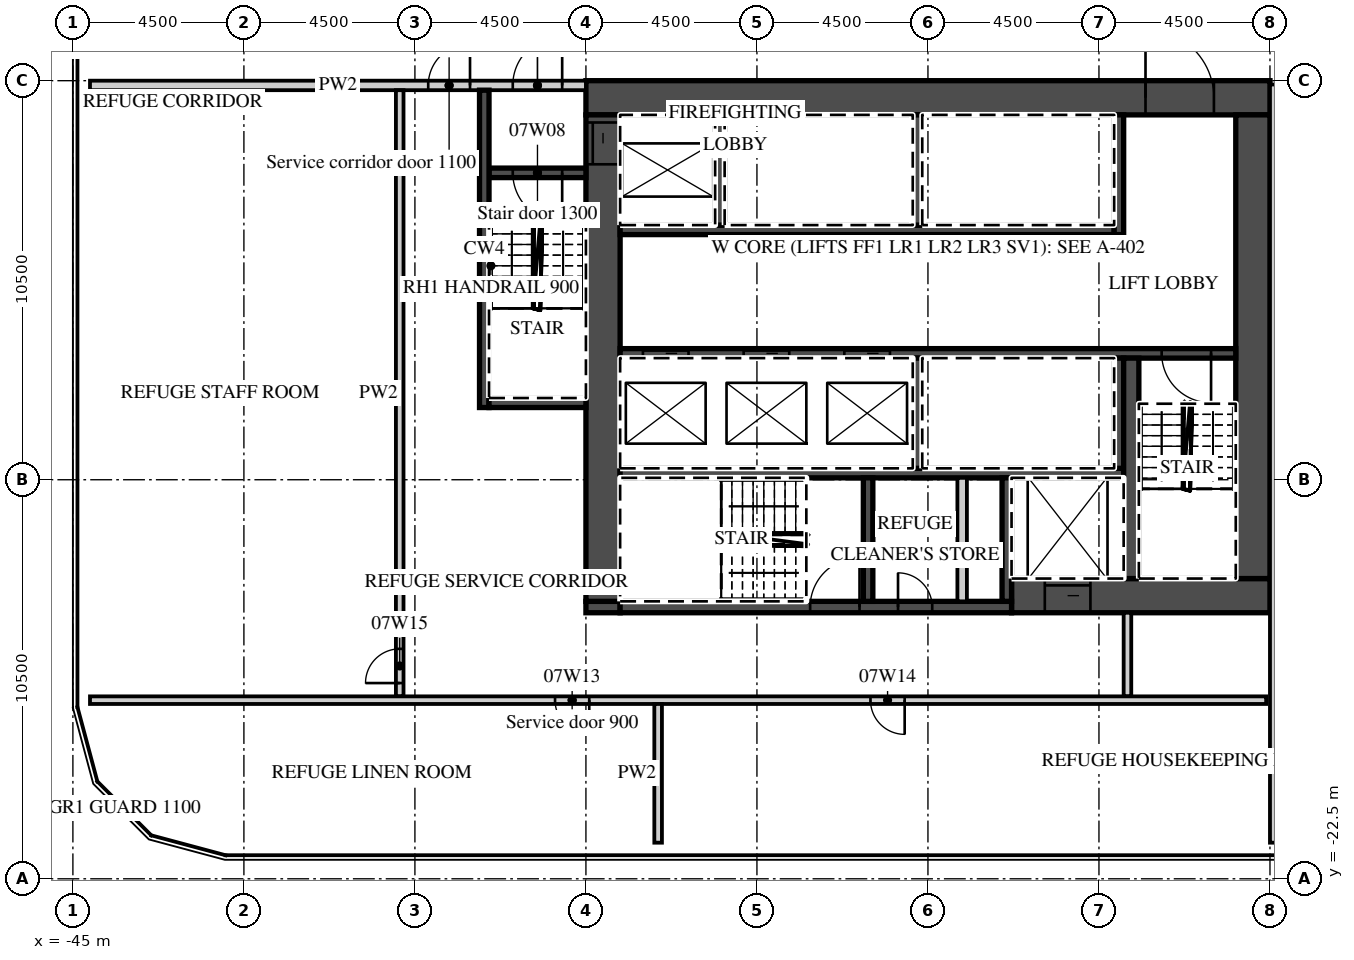
"""IFC4 building model, lengths in metres.
Left out: names, types, materials, properties, quantities, classifications, styles, units other than length and angle.
Written with IfcOpenShell. Run it as: python <this file> out.ifc"""

import sys

from ifc_helpers import new_model, si_unit, direction, frame, frame_2d, origin, place, context, subcontext, project, spatial, rectangle, extrude, element, fill, save


model = new_model("IFC4")
c1 = context("Model", 3, precision=1e-05, world=origin(), true_north=direction((0.0, 1.0)))
c2 = subcontext(c1, "Body", "Model", "MODEL_VIEW")
j1 = project(units=[si_unit("LENGTHUNIT", "METRE"), si_unit("PLANEANGLEUNIT", "RADIAN")], contexts=[c1])
p1 = place(None, origin())
s1 = spatial("IfcSite", under=j1, at=p1, CompositionType="ELEMENT")
p2 = place(p1, origin())
s2 = spatial("IfcBuilding", under=s1, at=p2, CompositionType="ELEMENT")
p3 = place(p2, frame((0.0, 0.0, 47.0)))
s3 = spatial("IfcBuildingStorey", under=s2, at=p3, CompositionType="ELEMENT", Elevation=47.0)
p4 = place(p3, frame((-31.5, -1.95, 0.0), z_axis=(0.0, 0.0, 1.0), x_axis=(1.0, 0.0, 0.0)))
e1 = element("IfcWall", 1, at=p4, inside=s3, PredefinedType="SHEAR", context=c2, shape_type="SweptSolid", body=[
    extrude(rectangle(XDim=18.0, YDim=0.9, at=frame_2d((9.0, 0.0))), origin(), (0.0, 0.0, 1.0), 5.6),
])
p5 = place(p4, frame((14.725, 0.0, 0.0)))
e2 = element("IfcOpeningElement", 2, at=p5, cuts=e1, PredefinedType="OPENING", context=c2, shape_type="SweptSolid", body=[
    extrude(rectangle(XDim=1.8, YDim=2.1, at=frame_2d((0.9, 1.05))), frame((0.0, 0.46, 0.0), z_axis=(0.0, -1.0, 0.0), x_axis=(1.0, 0.0, 0.0)), (0.0, 0.0, 1.0), 0.92),
])
p6 = place(p3, frame((-20.3, -15.05, 0.0), z_axis=(0.0, 0.0, 1.0), x_axis=(1.0, 0.0, 0.0)))
e3 = element("IfcWall", 3, at=p6, inside=s3, PredefinedType="SHEAR", context=c2, shape_type="SweptSolid", body=[
    extrude(rectangle(XDim=6.8, YDim=0.9, at=frame_2d((3.4, 0.0))), origin(), (0.0, 0.0, 1.0), 5.6),
])
p7 = place(p6, frame((0.875, 0.0, 0.0)))
e4 = element("IfcOpeningElement", 4, at=p7, cuts=e3, PredefinedType="OPENING", context=c2, shape_type="SweptSolid", body=[
    extrude(rectangle(XDim=1.2, YDim=2.1, at=frame_2d((0.6, 1.05))), frame((0.0, 0.46, 0.0), z_axis=(0.0, -1.0, 0.0), x_axis=(1.0, 0.0, 0.0)), (0.0, 0.0, 1.0), 0.92),
])
p8 = place(p3, frame((-31.5, -15.35, 0.0), z_axis=(0.0, 0.0, 1.0), x_axis=(1.0, 0.0, 0.0)))
e5 = element("IfcWall", 5, at=p8, inside=s3, PredefinedType="SHEAR", context=c2, shape_type="SweptSolid", body=[
    extrude(rectangle(XDim=0.9, YDim=0.3, at=frame_2d((0.45, 0.0))), origin(), (0.0, 0.0, 1.0), 5.6),
])
p9 = place(p3, frame((-30.6, -15.35, 0.0), z_axis=(0.0, 0.0, 1.0), x_axis=(1.0, 0.0, 0.0)))
e6 = element("IfcWall", 6, at=p9, inside=s3, PredefinedType="SHEAR", context=c2, shape_type="SweptSolid", body=[
    extrude(rectangle(XDim=10.3, YDim=0.3, at=frame_2d((5.15, 0.0))), origin(), (0.0, 0.0, 1.0), 5.6),
])
p10 = place(p9, frame((5.0, 0.0, 0.0)))
e7 = element("IfcOpeningElement", 7, at=p10, cuts=e6, PredefinedType="OPENING", context=c2, shape_type="SweptSolid", body=[
    extrude(rectangle(XDim=1.3, YDim=2.1, at=frame_2d((0.65, 1.05))), frame((0.0, 0.16, 0.0), z_axis=(0.0, -1.0, 0.0), x_axis=(1.0, 0.0, 0.0)), (0.0, 0.0, 1.0), 0.32),
])
p11 = place(p9, frame((7.312, 0.0, 0.0)))
e8 = element("IfcOpeningElement", 8, at=p11, cuts=e6, PredefinedType="OPENING", context=c2, shape_type="SweptSolid", body=[
    extrude(rectangle(XDim=0.9, YDim=2.1, at=frame_2d((0.45, 1.05))), frame((0.0, 0.16, 0.0), z_axis=(0.0, -1.0, 0.0), x_axis=(1.0, 0.0, 0.0)), (0.0, 0.0, 1.0), 0.32),
])
p12 = place(p3, frame((-31.05, -15.2, 0.0), z_axis=(0.0, 0.0, 1.0), x_axis=(0.0, 1.0, 0.0)))
e9 = element("IfcWall", 9, at=p12, inside=s3, PredefinedType="SHEAR", context=c2, shape_type="SweptSolid", body=[
    extrude(rectangle(XDim=12.8, YDim=0.9, at=frame_2d((6.4, 0.0))), origin(), (0.0, 0.0, 1.0), 5.6),
])
p13 = place(p12, frame((11.5, 0.0, 0.0)))
e10 = element("IfcOpeningElement", 10, at=p13, cuts=e9, PredefinedType="OPENING", context=c2, shape_type="SweptSolid", body=[
    extrude(rectangle(XDim=1.1, YDim=2.1, at=frame_2d((0.55, 1.05))), frame((0.0, 0.46, 0.0), z_axis=(0.0, -1.0, 0.0), x_axis=(1.0, 0.0, 0.0)), (0.0, 0.0, 1.0), 0.92),
])
p14 = place(p3, frame((-13.95, -14.6, 0.0), z_axis=(0.0, 0.0, 1.0), x_axis=(0.0, 1.0, 0.0)))
e11 = element("IfcWall", 11, at=p14, inside=s3, PredefinedType="SHEAR", context=c2, shape_type="SweptSolid", body=[
    extrude(rectangle(XDim=12.2, YDim=0.9, at=frame_2d((6.1, 0.0))), origin(), (0.0, 0.0, 1.0), 5.6),
])
p15 = place(p3, frame((-30.6, -5.425, 0.0), z_axis=(0.0, 0.0, 1.0), x_axis=(1.0, 0.0, 0.0)))
e12 = element("IfcWall", 12, at=p15, inside=s3, PredefinedType="SHEAR", context=c2, shape_type="SweptSolid", body=[
    extrude(rectangle(XDim=13.0, YDim=0.25, at=frame_2d((6.5, 0.0))), origin(), (0.0, 0.0, 1.0), 5.6),
])
p16 = place(p3, frame((-17.475, -5.55, 0.0), z_axis=(0.0, 0.0, 1.0), x_axis=(0.0, 1.0, 0.0)))
e13 = element("IfcWall", 13, at=p16, inside=s3, PredefinedType="SHEAR", context=c2, shape_type="SweptSolid", body=[
    extrude(rectangle(XDim=3.15, YDim=0.25, at=frame_2d((1.575, 0.0))), origin(), (0.0, 0.0, 1.0), 5.6),
])
for number, where, z_axis, x_axis in (
    (14, (-27.975, -5.3, 0.0), (0.0, 0.0, 1.0), (0.0, 1.0, 0.0)),
    (15, (-22.775, -5.3, 0.0), (0.0, 0.0, 1.0), (0.0, 1.0, 0.0)),
):
    element("IfcWall", number, at=place(p3, frame(where, z_axis=z_axis, x_axis=x_axis)), inside=s3, PredefinedType="SHEAR", context=c2, shape_type="SweptSolid", body=[
        extrude(rectangle(XDim=2.9, YDim=0.25, at=frame_2d((1.45, 0.0))), origin(), (0.0, 0.0, 1.0), 5.6),
    ])
p17 = place(p3, frame((-30.6, -8.675, 0.0), z_axis=(0.0, 0.0, 1.0), x_axis=(1.0, 0.0, 0.0)))
e16 = element("IfcWall", 16, at=p17, inside=s3, PredefinedType="SHEAR", context=c2, shape_type="SweptSolid", body=[
    extrude(rectangle(XDim=16.2, YDim=0.25, at=frame_2d((8.1, 0.0))), origin(), (0.0, 0.0, 1.0), 5.6),
])
p18 = place(p17, frame((0.6, 0.0, 0.0)))
e17 = element("IfcOpeningElement", 17, at=p18, cuts=e16, PredefinedType="OPENING", context=c2, shape_type="SweptSolid", body=[
    extrude(rectangle(XDim=1.2, YDim=2.1, at=frame_2d((0.6, 1.05))), frame((0.0, 0.135, 0.0), z_axis=(0.0, -1.0, 0.0), x_axis=(1.0, 0.0, 0.0)), (0.0, 0.0, 1.0), 0.27),
])
p19 = place(p17, frame((3.25, 0.0, 0.0)))
e18 = element("IfcOpeningElement", 18, at=p19, cuts=e16, PredefinedType="OPENING", context=c2, shape_type="SweptSolid", body=[
    extrude(rectangle(XDim=1.2, YDim=2.1, at=frame_2d((0.6, 1.05))), frame((0.0, 0.135, 0.0), z_axis=(0.0, -1.0, 0.0), x_axis=(1.0, 0.0, 0.0)), (0.0, 0.0, 1.0), 0.27),
])
p20 = place(p17, frame((5.9, 0.0, 0.0)))
e19 = element("IfcOpeningElement", 19, at=p20, cuts=e16, PredefinedType="OPENING", context=c2, shape_type="SweptSolid", body=[
    extrude(rectangle(XDim=1.2, YDim=2.1, at=frame_2d((0.6, 1.05))), frame((0.0, 0.135, 0.0), z_axis=(0.0, -1.0, 0.0), x_axis=(1.0, 0.0, 0.0)), (0.0, 0.0, 1.0), 0.27),
])
p21 = place(p17, frame((14.25, 0.0, 0.0)))
e20 = element("IfcOpeningElement", 20, at=p21, cuts=e16, PredefinedType="OPENING", context=c2, shape_type="SweptSolid", body=[
    extrude(rectangle(XDim=1.3, YDim=2.1, at=frame_2d((0.65, 1.05))), frame((0.0, 0.135, 0.0), z_axis=(0.0, -1.0, 0.0), x_axis=(1.0, 0.0, 0.0)), (0.0, 0.0, 1.0), 0.27),
])
p22 = place(p3, frame((-30.6, -11.825, 0.0), z_axis=(0.0, 0.0, 1.0), x_axis=(1.0, 0.0, 0.0)))
e21 = element("IfcWall", 21, at=p22, inside=s3, PredefinedType="SHEAR", context=c2, shape_type="SweptSolid", body=[
    extrude(rectangle(XDim=13.25, YDim=0.25, at=frame_2d((6.625, 0.0))), origin(), (0.0, 0.0, 1.0), 5.6),
])
for number, where, z_axis, x_axis in (
    (22, (-17.475, -11.7, 0.0), (0.0, 0.0, 1.0), (0.0, 1.0, 0.0)),
    (23, (-22.775, -11.7, 0.0), (0.0, 0.0, 1.0), (0.0, 1.0, 0.0)),
):
    element("IfcWall", number, at=place(p3, frame(where, z_axis=z_axis, x_axis=x_axis)), inside=s3, PredefinedType="SHEAR", context=c2, shape_type="SweptSolid", body=[
        extrude(rectangle(XDim=2.9, YDim=0.25, at=frame_2d((1.45, 0.0))), origin(), (0.0, 0.0, 1.0), 5.6),
    ])
p23 = place(p3, frame((-17.15, -14.6, 0.0), z_axis=(0.0, 0.0, 1.0), x_axis=(0.0, 1.0, 0.0)))
e24 = element("IfcWall", 24, at=p23, inside=s3, PredefinedType="SHEAR", context=c2, shape_type="SweptSolid", body=[
    extrude(rectangle(XDim=5.8, YDim=0.4, at=frame_2d((2.9, 0.0))), origin(), (0.0, 0.0, 1.0), 5.6),
])
for number, where, z_axis, x_axis in (
    (25, (-20.425, -15.2, 0.0), (0.0, 0.0, 1.0), (0.0, 1.0, 0.0)),
    (26, (-24.075, -15.2, 0.0), (0.0, 0.0, 1.0), (0.0, 1.0, 0.0)),
):
    element("IfcWall", number, at=place(p3, frame(where, z_axis=z_axis, x_axis=x_axis)), inside=s3, PredefinedType="SHEAR", context=c2, shape_type="SweptSolid", body=[
        extrude(rectangle(XDim=3.25, YDim=0.25, at=frame_2d((1.625, 0.0))), origin(), (0.0, 0.0, 1.0), 5.6),
    ])
p24 = place(p3, frame((-21.6, -15.2, 0.0), z_axis=(0.0, 0.0, 1.0), x_axis=(0.0, 1.0, 0.0)))
e27 = element("IfcWall", 27, at=p24, inside=s3, PredefinedType="PARTITIONING", context=c2, shape_type="SweptSolid", body=[
    extrude(rectangle(XDim=3.25, YDim=0.25, at=frame_2d((1.625, 0.0))), origin(), (0.0, 0.0, 1.0), 5.6),
])
p25 = place(p3, frame((-44.55, -1.625, 0.0), z_axis=(0.0, 0.0, 1.0), x_axis=(1.0, 0.0, 0.0)))
e28 = element("IfcWall", 28, at=p25, inside=s3, PredefinedType="PARTITIONING", context=c2, shape_type="SweptSolid", body=[
    extrude(rectangle(XDim=13.05, YDim=0.25, at=frame_2d((6.525, 0.0))), origin(), (0.0, 0.0, 1.0), 5.6),
])
p26 = place(p25, frame((11.125, 0.0, 0.0)))
e29 = element("IfcOpeningElement", 29, at=p26, cuts=e28, PredefinedType="OPENING", context=c2, shape_type="SweptSolid", body=[
    extrude(rectangle(XDim=1.3, YDim=2.1, at=frame_2d((0.65, 1.05))), frame((0.0, 0.135, 0.0), z_axis=(0.0, -1.0, 0.0), x_axis=(1.0, 0.0, 0.0)), (0.0, 0.0, 1.0), 0.27),
])
p27 = place(p25, frame((8.9, 0.0, 0.0)))
e30 = element("IfcOpeningElement", 30, at=p27, cuts=e28, PredefinedType="OPENING", context=c2, shape_type="SweptSolid", body=[
    extrude(rectangle(XDim=1.1, YDim=2.1, at=frame_2d((0.55, 1.05))), frame((0.0, 0.135, 0.0), z_axis=(0.0, -1.0, 0.0), x_axis=(1.0, 0.0, 0.0)), (0.0, 0.0, 1.0), 0.27),
])
p28 = place(p3, frame((-34.05, -3.925, 0.0), z_axis=(0.0, 0.0, 1.0), x_axis=(1.0, 0.0, 0.0)))
e31 = element("IfcWall", 31, at=p28, inside=s3, PredefinedType="SHEAR", context=c2, shape_type="SweptSolid", body=[
    extrude(rectangle(XDim=2.55, YDim=0.25, at=frame_2d((1.275, 0.0))), origin(), (0.0, 0.0, 1.0), 5.6),
])
p29 = place(p28, frame((0.625, 0.0, 0.0)))
e32 = element("IfcOpeningElement", 32, at=p29, cuts=e31, PredefinedType="OPENING", context=c2, shape_type="SweptSolid", body=[
    extrude(rectangle(XDim=1.3, YDim=2.1, at=frame_2d((0.65, 1.05))), frame((0.0, 0.135, 0.0), z_axis=(0.0, -1.0, 0.0), x_axis=(1.0, 0.0, 0.0)), (0.0, 0.0, 1.0), 0.27),
])
p30 = place(p3, frame((-34.175, -10.1, 0.0), z_axis=(0.0, 0.0, 1.0), x_axis=(0.0, 1.0, 0.0)))
e33 = element("IfcWall", 33, at=p30, inside=s3, PredefinedType="SHEAR", context=c2, shape_type="SweptSolid", body=[
    extrude(rectangle(XDim=8.35, YDim=0.25, at=frame_2d((4.175, 0.0))), origin(), (0.0, 0.0, 1.0), 5.6),
])
p31 = place(p3, frame((-34.05, -9.975, 0.0), z_axis=(0.0, 0.0, 1.0), x_axis=(1.0, 0.0, 0.0)))
e34 = element("IfcWall", 34, at=p31, inside=s3, PredefinedType="SHEAR", context=c2, shape_type="SweptSolid", body=[
    extrude(rectangle(XDim=2.55, YDim=0.25, at=frame_2d((1.275, 0.0))), origin(), (0.0, 0.0, 1.0), 5.6),
])
p32 = place(p3, frame((-17.25, -17.7, 0.0), z_axis=(0.0, 0.0, 1.0), x_axis=(0.0, 1.0, 0.0)))
e35 = element("IfcWall", 35, at=p32, inside=s3, PredefinedType="PARTITIONING", context=c2, shape_type="SweptSolid", body=[
    extrude(rectangle(XDim=2.2, YDim=0.2, at=frame_2d((1.1, 0.0))), origin(), (0.0, 0.0, 1.0), 5.6),
])
p33 = place(p3, frame((-36.4, -17.7, 0.0), z_axis=(0.0, 0.0, 1.0), x_axis=(0.0, 1.0, 0.0)))
e36 = element("IfcWall", 36, at=p33, inside=s3, PredefinedType="PARTITIONING", context=c2, shape_type="SweptSolid", body=[
    extrude(rectangle(XDim=15.95, YDim=0.2, at=frame_2d((7.975, 0.0))), origin(), (0.0, 0.0, 1.0), 5.6),
])
p34 = place(p33, frame((0.35, 0.0, 0.0)))
e37 = element("IfcOpeningElement", 37, at=p34, cuts=e36, PredefinedType="OPENING", context=c2, shape_type="SweptSolid", body=[
    extrude(rectangle(XDim=0.9, YDim=2.1, at=frame_2d((0.45, 1.05))), frame((0.0, 0.11, 0.0), z_axis=(0.0, -1.0, 0.0), x_axis=(1.0, 0.0, 0.0)), (0.0, 0.0, 1.0), 0.22),
])
p35 = place(p3, frame((-44.55, -17.8, 0.0), z_axis=(0.0, 0.0, 1.0), x_axis=(1.0, 0.0, 0.0)))
e38 = element("IfcWall", 38, at=p35, inside=s3, PredefinedType="PARTITIONING", context=c2, shape_type="SweptSolid", body=[
    extrude(rectangle(XDim=30.95, YDim=0.2, at=frame_2d((15.475, 0.0))), origin(), (0.0, 0.0, 1.0), 5.6),
])
p36 = place(p35, frame((12.238, 0.0, 0.0)))
e39 = element("IfcOpeningElement", 39, at=p36, cuts=e38, PredefinedType="OPENING", context=c2, shape_type="SweptSolid", body=[
    extrude(rectangle(XDim=0.9, YDim=2.1, at=frame_2d((0.45, 1.05))), frame((0.0, 0.11, 0.0), z_axis=(0.0, -1.0, 0.0), x_axis=(1.0, 0.0, 0.0)), (0.0, 0.0, 1.0), 0.22),
])
p37 = place(p35, frame((20.538, 0.0, 0.0)))
e40 = element("IfcOpeningElement", 40, at=p37, cuts=e38, PredefinedType="OPENING", context=c2, shape_type="SweptSolid", body=[
    extrude(rectangle(XDim=0.9, YDim=2.1, at=frame_2d((0.45, 1.05))), frame((0.0, 0.11, 0.0), z_axis=(0.0, -1.0, 0.0), x_axis=(1.0, 0.0, 0.0)), (0.0, 0.0, 1.0), 0.22),
])
p38 = place(p3, frame((-29.6, -21.55, 0.0), z_axis=(0.0, 0.0, 1.0), x_axis=(0.0, 1.0, 0.0)))
e41 = element("IfcWall", 41, at=p38, inside=s3, PredefinedType="PARTITIONING", context=c2, shape_type="SweptSolid", body=[
    extrude(rectangle(XDim=3.65, YDim=0.2, at=frame_2d((1.825, 0.0))), origin(), (0.0, 0.0, 1.0), 5.6),
])
p39 = place(p3, frame((-13.4, -21.55, 0.0), z_axis=(0.0, 0.0, 1.0), x_axis=(0.0, 1.0, 0.0)))
e42 = element("IfcWall", 42, at=p39, inside=s3, PredefinedType="PARTITIONING", context=c2, shape_type="SweptSolid", body=[
    extrude(rectangle(XDim=19.95, YDim=0.2, at=frame_2d((9.975, 0.0))), origin(), (0.0, 0.0, 1.0), 5.6),
])
p40 = place(p18, origin())
e43 = element("IfcDoor", 43, at=p40, inside=s3, OperationType="SLIDING_TO_LEFT", PredefinedType="DOOR", context=c2, shape_type="SweptSolid", body=[
    extrude(rectangle(XDim=1.2, YDim=2.1, at=frame_2d((0.6, 1.05))), frame((0.0, 0.025, 0.0), z_axis=(0.0, -1.0, 0.0), x_axis=(1.0, 0.0, 0.0)), (0.0, 0.0, 1.0), 0.05),
])
fill(e17, e43)
p41 = place(p19, origin())
e44 = element("IfcDoor", 44, at=p41, inside=s3, OperationType="SLIDING_TO_RIGHT", PredefinedType="DOOR", context=c2, shape_type="SweptSolid", body=[
    extrude(rectangle(XDim=1.2, YDim=2.1, at=frame_2d((0.6, 1.05))), frame((0.0, 0.025, 0.0), z_axis=(0.0, -1.0, 0.0), x_axis=(1.0, 0.0, 0.0)), (0.0, 0.0, 1.0), 0.05),
])
fill(e18, e44)
p42 = place(p20, origin())
e45 = element("IfcDoor", 45, at=p42, inside=s3, OperationType="SLIDING_TO_RIGHT", PredefinedType="DOOR", context=c2, shape_type="SweptSolid", body=[
    extrude(rectangle(XDim=1.2, YDim=2.1, at=frame_2d((0.6, 1.05))), frame((0.0, 0.025, 0.0), z_axis=(0.0, -1.0, 0.0), x_axis=(1.0, 0.0, 0.0)), (0.0, 0.0, 1.0), 0.05),
])
fill(e19, e45)
p43 = place(p7, origin())
e46 = element("IfcDoor", 46, at=p43, inside=s3, OperationType="SLIDING_TO_LEFT", PredefinedType="DOOR", context=c2, shape_type="SweptSolid", body=[
    extrude(rectangle(XDim=1.2, YDim=2.1, at=frame_2d((0.6, 1.05))), frame((0.0, 0.025, 0.0), z_axis=(0.0, -1.0, 0.0), x_axis=(1.0, 0.0, 0.0)), (0.0, 0.0, 1.0), 0.05),
])
fill(e4, e46)
p44 = place(p13, origin())
e47 = element("IfcDoor", 47, at=p44, inside=s3, OperationType="SLIDING_TO_RIGHT", PredefinedType="DOOR", context=c2, shape_type="SweptSolid", body=[
    extrude(rectangle(XDim=1.1, YDim=2.1, at=frame_2d((0.55, 1.05))), frame((0.0, 0.025, 0.0), z_axis=(0.0, -1.0, 0.0), x_axis=(1.0, 0.0, 0.0)), (0.0, 0.0, 1.0), 0.05),
])
fill(e10, e47)
p45 = place(p5, origin())
e48 = element("IfcDoor", 48, at=p45, inside=s3, OperationType="DOUBLE_DOOR_DOUBLE_SWING", PredefinedType="DOOR", context=c2, shape_type="SweptSolid", body=[
    extrude(rectangle(XDim=1.8, YDim=2.1, at=frame_2d((0.9, 1.05))), frame((0.0, 0.025, 0.0), z_axis=(0.0, -1.0, 0.0), x_axis=(1.0, 0.0, 0.0)), (0.0, 0.0, 1.0), 0.05),
])
fill(e2, e48)
p46 = place(p26, origin())
e49 = element("IfcDoor", 49, at=p46, inside=s3, OperationType="SINGLE_SWING_RIGHT", PredefinedType="DOOR", context=c2, shape_type="SweptSolid", body=[
    extrude(rectangle(XDim=1.3, YDim=2.1, at=frame_2d((0.65, 1.05))), frame((0.0, 0.025, 0.0), z_axis=(0.0, -1.0, 0.0), x_axis=(1.0, 0.0, 0.0)), (0.0, 0.0, 1.0), 0.05),
])
fill(e29, e49)
p47 = place(p29, origin())
e50 = element("IfcDoor", 50, at=p47, inside=s3, OperationType="SINGLE_SWING_RIGHT", PredefinedType="DOOR", context=c2, shape_type="SweptSolid", body=[
    extrude(rectangle(XDim=1.3, YDim=2.1, at=frame_2d((0.65, 1.05))), frame((0.0, 0.025, 0.0), z_axis=(0.0, -1.0, 0.0), x_axis=(1.0, 0.0, 0.0)), (0.0, 0.0, 1.0), 0.05),
])
fill(e32, e50)
p48 = place(p27, origin())
e51 = element("IfcDoor", 51, at=p48, inside=s3, OperationType="SINGLE_SWING_RIGHT", PredefinedType="DOOR", context=c2, shape_type="SweptSolid", body=[
    extrude(rectangle(XDim=1.1, YDim=2.1, at=frame_2d((0.55, 1.05))), frame((0.0, 0.025, 0.0), z_axis=(0.0, -1.0, 0.0), x_axis=(1.0, 0.0, 0.0)), (0.0, 0.0, 1.0), 0.05),
])
fill(e30, e51)
p49 = place(p21, origin())
e52 = element("IfcDoor", 52, at=p49, inside=s3, OperationType="SINGLE_SWING_RIGHT", PredefinedType="DOOR", context=c2, shape_type="SweptSolid", body=[
    extrude(rectangle(XDim=1.3, YDim=2.1, at=frame_2d((0.65, 1.05))), frame((0.0, 0.025, 0.0), z_axis=(0.0, -1.0, 0.0), x_axis=(1.0, 0.0, 0.0)), (0.0, 0.0, 1.0), 0.05),
])
fill(e20, e52)
p50 = place(p10, origin())
e53 = element("IfcDoor", 53, at=p50, inside=s3, OperationType="SINGLE_SWING_RIGHT", PredefinedType="DOOR", context=c2, shape_type="SweptSolid", body=[
    extrude(rectangle(XDim=1.3, YDim=2.1, at=frame_2d((0.65, 1.05))), frame((0.0, 0.025, 0.0), z_axis=(0.0, -1.0, 0.0), x_axis=(1.0, 0.0, 0.0)), (0.0, 0.0, 1.0), 0.05),
])
fill(e7, e53)
p51 = place(p11, origin())
e54 = element("IfcDoor", 54, at=p51, inside=s3, OperationType="SINGLE_SWING_LEFT", PredefinedType="DOOR", context=c2, shape_type="SweptSolid", body=[
    extrude(rectangle(XDim=0.9, YDim=2.1, at=frame_2d((0.45, 1.05))), frame((0.0, 0.025, 0.0), z_axis=(0.0, -1.0, 0.0), x_axis=(1.0, 0.0, 0.0)), (0.0, 0.0, 1.0), 0.05),
])
fill(e8, e54)
p52 = place(p36, origin())
e55 = element("IfcDoor", 55, at=p52, inside=s3, OperationType="SINGLE_SWING_RIGHT", PredefinedType="DOOR", context=c2, shape_type="SweptSolid", body=[
    extrude(rectangle(XDim=0.9, YDim=2.1, at=frame_2d((0.45, 1.05))), frame((0.0, 0.025, 0.0), z_axis=(0.0, -1.0, 0.0), x_axis=(1.0, 0.0, 0.0)), (0.0, 0.0, 1.0), 0.05),
])
fill(e39, e55)
p53 = place(p37, origin())
e56 = element("IfcDoor", 56, at=p53, inside=s3, OperationType="SINGLE_SWING_RIGHT", PredefinedType="DOOR", context=c2, shape_type="SweptSolid", body=[
    extrude(rectangle(XDim=0.9, YDim=2.1, at=frame_2d((0.45, 1.05))), frame((0.0, 0.025, 0.0), z_axis=(0.0, -1.0, 0.0), x_axis=(1.0, 0.0, 0.0)), (0.0, 0.0, 1.0), 0.05),
])
fill(e40, e56)
p54 = place(p34, origin())
e57 = element("IfcDoor", 57, at=p54, inside=s3, OperationType="SINGLE_SWING_LEFT", PredefinedType="DOOR", context=c2, shape_type="SweptSolid", body=[
    extrude(rectangle(XDim=0.9, YDim=2.1, at=frame_2d((0.45, 1.05))), frame((0.0, 0.025, 0.0), z_axis=(0.0, -1.0, 0.0), x_axis=(1.0, 0.0, 0.0)), (0.0, 0.0, 1.0), 0.05),
])
fill(e37, e57)
save(model, sys.argv[1])
